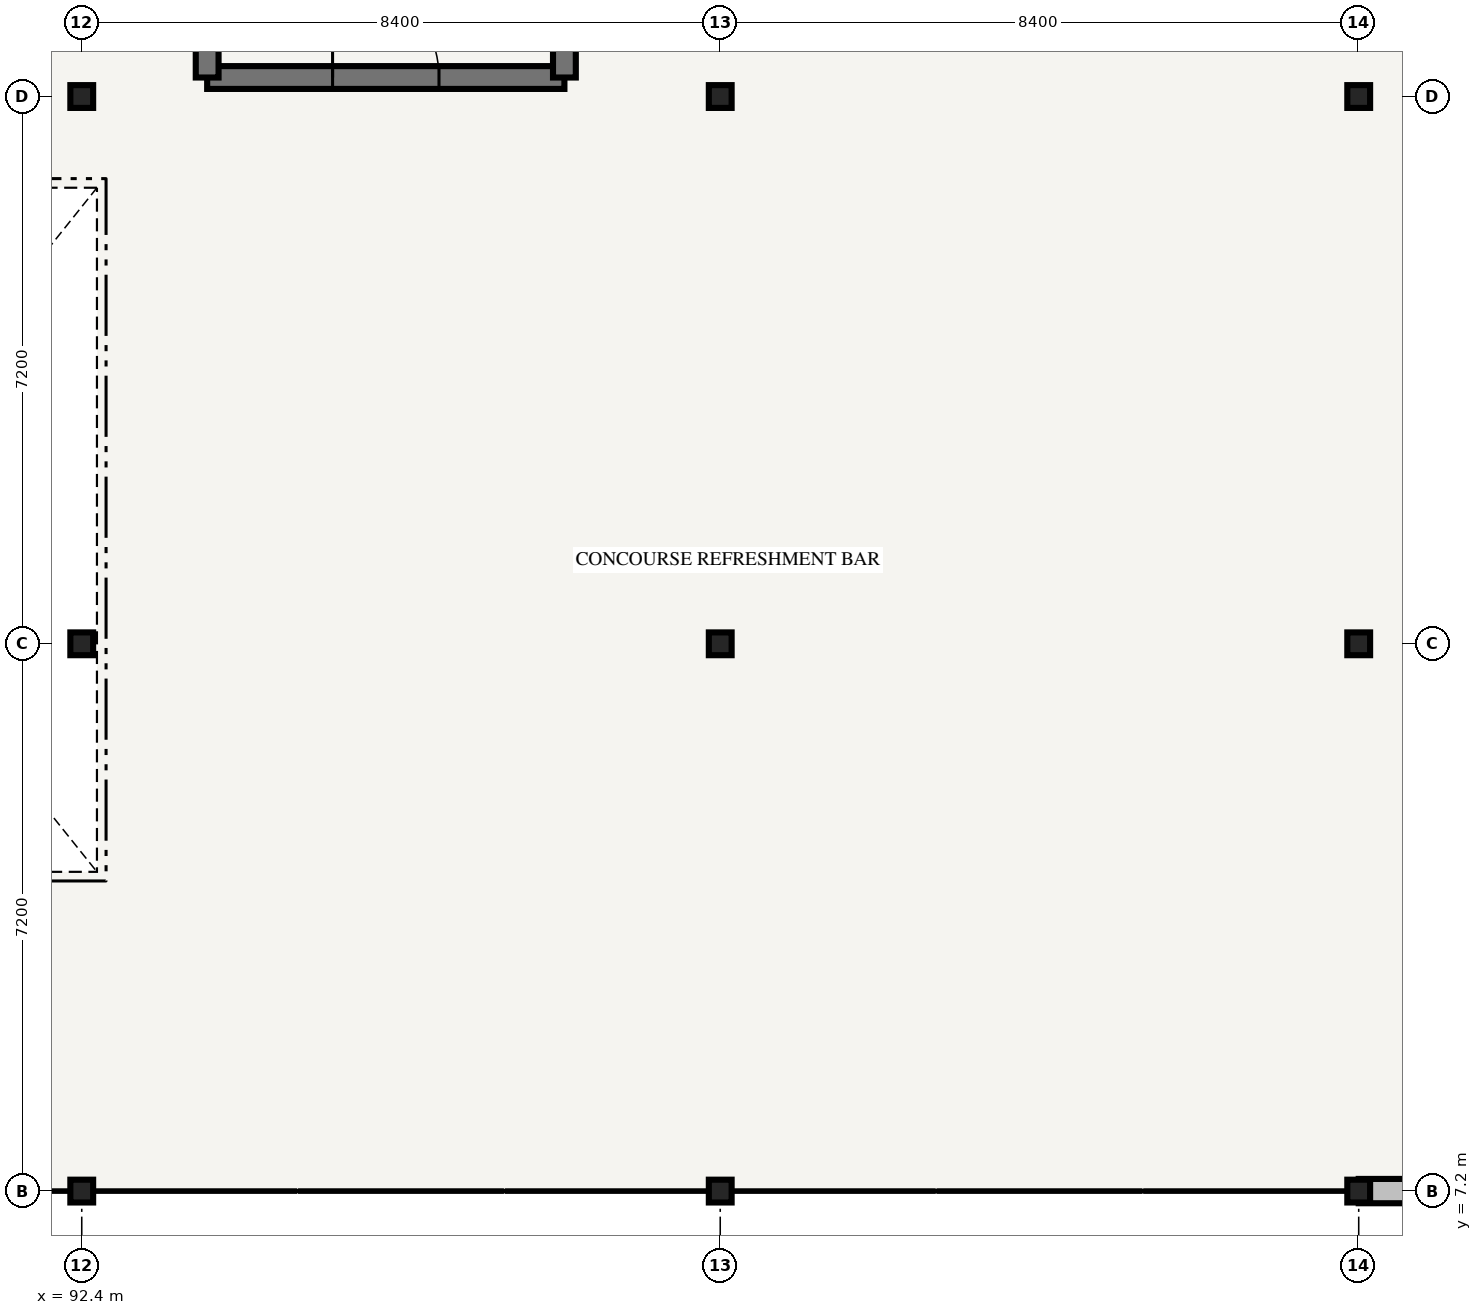
"""IFC4 building model, lengths in metres.
Left out: names, types, materials, properties, quantities, classifications, styles, units other than length and angle.
Written with IfcOpenShell. Run it as: python <this file> out.ifc"""

import sys

from ifc_helpers import new_model, si_unit, direction, frame, frame_2d, origin, origin_2d, place, context, subcontext, project, spatial, rectangle, i_section, extrude, element, fill, save


model = new_model("IFC4")
c1 = context("Model", 3, precision=1e-05, world=origin(), true_north=direction((0.0, 1.0)))
c2 = subcontext(c1, "Body", "Model", "MODEL_VIEW")
j1 = project(units=[si_unit("LENGTHUNIT", "METRE"), si_unit("PLANEANGLEUNIT", "RADIAN")], contexts=[c1])
p1 = place(None, origin())
s1 = spatial("IfcSite", under=j1, at=p1, CompositionType="ELEMENT")
p2 = place(p1, origin())
s2 = spatial("IfcBuilding", under=s1, at=p2, CompositionType="ELEMENT")
p3 = place(p2, frame((0.0, 0.0, 4.5)))
s3 = spatial("IfcBuildingStorey", under=s2, at=p3, CompositionType="ELEMENT", Elevation=4.5)
for number, where, z_axis, x_axis in (
    (1, (92.4, 7.2, 0.0), (0.0, 0.0, 1.0), (1.0, 0.0, 0.0)),
    (2, (92.4, 14.4, 0.0), (0.0, 0.0, 1.0), (1.0, 0.0, 0.0)),
    (3, (92.4, 21.6, 0.0), (0.0, 0.0, 1.0), (1.0, 0.0, 0.0)),
    (4, (100.8, 7.2, 0.0), (0.0, 0.0, 1.0), (1.0, 0.0, 0.0)),
    (5, (100.8, 14.4, 0.0), (0.0, 0.0, 1.0), (1.0, 0.0, 0.0)),
    (6, (100.8, 21.6, 0.0), (0.0, 0.0, 1.0), (1.0, 0.0, 0.0)),
    (7, (109.2, 7.2, 0.0), (0.0, 0.0, 1.0), (1.0, 0.0, 0.0)),
    (8, (109.2, 14.4, 0.0), (0.0, 0.0, 1.0), (1.0, 0.0, 0.0)),
    (9, (109.2, 21.6, 0.0), (0.0, 0.0, 1.0), (1.0, 0.0, 0.0)),
):
    element("IfcColumn", number, at=place(p3, frame(where, z_axis=z_axis, x_axis=x_axis)), inside=s3, PredefinedType="COLUMN", context=c2, shape_type="SweptSolid", body=[
        extrude(i_section(OverallWidth=0.3, OverallDepth=0.3, WebThickness=0.011, FlangeThickness=0.019, FilletRadius=0.027, at=origin_2d()), origin(), (0.0, 0.0, 1.0), 4.2),
    ])
p4 = place(p3, frame((109.2, 7.2, 0.0), z_axis=(0.0, 0.0, 1.0), x_axis=(1.0, 0.0, 0.0)))
e10 = element("IfcWall", 10, at=p4, inside=s3, PredefinedType="STANDARD", context=c2, shape_type="SweptSolid", body=[
    extrude(rectangle(XDim=8.4, YDim=0.32, at=frame_2d((4.2, 0.0))), origin(), (0.0, 0.0, 1.0), 3.455),
])
p5 = place(p4, frame((3.15, 0.0, 0.85)))
e11 = element("IfcOpeningElement", 11, at=p5, cuts=e10, PredefinedType="OPENING", context=c2, shape_type="SweptSolid", body=[
    extrude(rectangle(XDim=2.1, YDim=1.45, at=frame_2d((1.05, 0.725))), frame((0.0, 0.185, 0.0), z_axis=(0.0, -1.0, 0.0), x_axis=(1.0, 0.0, 0.0)), (0.0, 0.0, 1.0), 0.37),
])
p6 = place(p3, frame((94.05, 21.85, 0.0), z_axis=(0.0, 0.0, 1.0), x_axis=(1.0, 0.0, 0.0)))
e12 = element("IfcWall", 12, at=p6, inside=s3, PredefinedType="SHEAR", context=c2, shape_type="SweptSolid", body=[
    extrude(rectangle(XDim=4.7, YDim=0.3, at=frame_2d((2.35, 0.0))), origin(), (0.0, 0.0, 1.0), 4.56),
])
p7 = place(p6, frame((1.65, 0.0, 0.0)))
e13 = element("IfcOpeningElement", 13, at=p7, cuts=e12, PredefinedType="OPENING", context=c2, shape_type="SweptSolid", body=[
    extrude(rectangle(XDim=1.4, YDim=2.2, at=frame_2d((0.7, 1.1))), frame((0.0, 0.175, 0.0), z_axis=(0.0, -1.0, 0.0), x_axis=(1.0, 0.0, 0.0)), (0.0, 0.0, 1.0), 0.35),
])
for number, where, z_axis, x_axis in (
    (14, (98.75, 21.85, 0.0), (0.0, 0.0, 1.0), (0.0, 1.0, 0.0)),
    (15, (94.05, 28.75, 0.0), (0.0, 0.0, 1.0), (0.0, -1.0, 0.0)),
):
    element("IfcWall", number, at=place(p3, frame(where, z_axis=z_axis, x_axis=x_axis)), inside=s3, PredefinedType="SHEAR", context=c2, shape_type="SweptSolid", body=[
        extrude(rectangle(XDim=6.9, YDim=0.3, at=frame_2d((3.45, 0.0))), origin(), (0.0, 0.0, 1.0), 4.56),
    ])
p8 = place(p7, frame((1.4, 0.0, 0.0), z_axis=(0.0, 0.0, 1.0), x_axis=(-1.0, 0.0, 0.0)))
e16 = element("IfcDoor", 16, at=p8, inside=s3, OperationType="SINGLE_SWING_LEFT", PredefinedType="DOOR", context=c2, shape_type="SweptSolid", body=[
    extrude(rectangle(XDim=1.4, YDim=2.2, at=frame_2d((0.7, 1.1))), frame((0.0, 0.025, 0.0), z_axis=(0.0, -1.0, 0.0), x_axis=(1.0, 0.0, 0.0)), (0.0, 0.0, 1.0), 0.05),
])
fill(e13, e16)
save(model, sys.argv[1])
